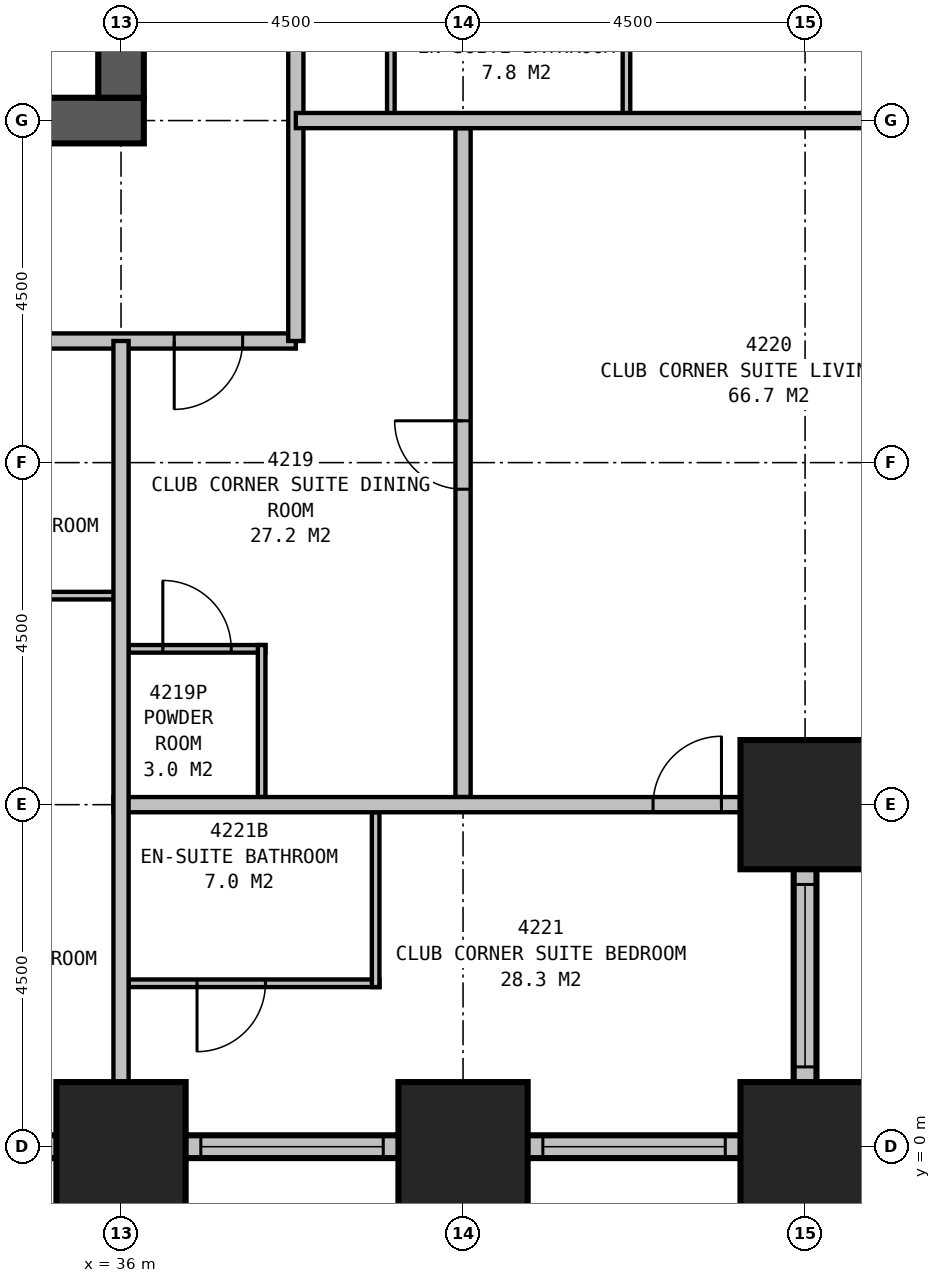
"""IFC4 building model, lengths in metres.
Left out: names, types, materials, properties, quantities, classifications, styles, units other than length and angle.
Written with IfcOpenShell. Run it as: python <this file> out.ifc"""

import sys

from ifc_helpers import new_model, si_unit, direction, frame, frame_2d, origin, origin_2d, place, context, subcontext, project, spatial, rectangle, extrude, element, fill, save


model = new_model("IFC4")
c1 = context("Model", 3, precision=1e-05, world=origin(), true_north=direction((0.0, 1.0)))
c2 = subcontext(c1, "Body", "Model", "MODEL_VIEW")
j1 = project(units=[si_unit("LENGTHUNIT", "METRE"), si_unit("PLANEANGLEUNIT", "RADIAN")], contexts=[c1])
p1 = place(None, origin())
s1 = spatial("IfcSite", under=j1, at=p1, CompositionType="ELEMENT")
p2 = place(p1, origin())
s2 = spatial("IfcBuilding", under=s1, at=p2, CompositionType="ELEMENT")
p3 = place(p2, frame((0.0, 0.0, 165.9)))
s3 = spatial("IfcBuildingStorey", under=s2, at=p3, CompositionType="ELEMENT", Elevation=165.9)
for number, where, z_axis, x_axis in (
    (1, (36.0, 0.0, 0.0), (0.0, 0.0, 1.0), (1.0, 0.0, 0.0)),
    (2, (40.5, 0.0, 0.0), (0.0, 0.0, 1.0), (1.0, 0.0, 0.0)),
    (3, (45.0, 0.0, 0.0), (0.0, 0.0, 1.0), (1.0, 0.0, 0.0)),
    (4, (45.0, 4.5, 0.0), (0.0, 0.0, 1.0), (1.0, 0.0, 0.0)),
):
    element("IfcColumn", number, at=place(p3, frame(where, z_axis=z_axis, x_axis=x_axis)), inside=s3, PredefinedType="COLUMN", context=c2, shape_type="SweptSolid", body=[
        extrude(rectangle(XDim=1.7, YDim=1.7, at=origin_2d()), origin(), (0.0, 0.0, 1.0), 3.5),
    ])
p4 = place(p3, frame((13.2, 13.5, 0.0), z_axis=(0.0, 0.0, 1.0), x_axis=(1.0, 0.0, 0.0)))
e5 = element("IfcWall", 5, at=p4, inside=s3, PredefinedType="SHEAR", context=c2, shape_type="SweptSolid", body=[
    extrude(rectangle(XDim=23.1, YDim=0.6, at=frame_2d((11.55, 0.0))), origin(), (0.0, 0.0, 1.0), 3.5),
])
p5 = place(p3, frame((36.0, 13.8, 0.0), z_axis=(0.0, 0.0, 1.0), x_axis=(0.0, 1.0, 0.0)))
e6 = element("IfcWall", 6, at=p5, inside=s3, PredefinedType="SHEAR", context=c2, shape_type="SweptSolid", body=[
    extrude(rectangle(XDim=2.7, YDim=0.6, at=frame_2d((1.35, 0.0))), origin(), (0.0, 0.0, 1.0), 3.5),
])
p6 = place(p3, frame((8.85, 0.0, 0.0), z_axis=(0.0, 0.0, 1.0), x_axis=(1.0, 0.0, 0.0)))
e7 = element("IfcWall", 7, at=p6, inside=s3, PredefinedType="STANDARD", context=c2, shape_type="SweptSolid", body=[
    extrude(rectangle(XDim=36.3, YDim=0.3, at=frame_2d((18.15, 0.0))), origin(), (0.0, 0.0, 1.0), 2.25),
])
p7 = place(p6, frame((1.65, 0.0, 0.5)))
e8 = element("IfcOpeningElement", 8, at=p7, cuts=e7, PredefinedType="OPENING", context=c2, shape_type="SweptSolid", body=[
    extrude(rectangle(XDim=1.5, YDim=1.6, at=frame_2d((0.75, 0.8))), frame((0.0, 0.16, 0.0), z_axis=(0.0, -1.0, 0.0), x_axis=(1.0, 0.0, 0.0)), (0.0, 0.0, 1.0), 0.32),
])
p8 = place(p6, frame((5.7, 0.0, 0.5)))
e9 = element("IfcOpeningElement", 9, at=p8, cuts=e7, PredefinedType="OPENING", context=c2, shape_type="SweptSolid", body=[
    extrude(rectangle(XDim=2.4, YDim=1.6, at=frame_2d((1.2, 0.8))), frame((0.0, 0.16, 0.0), z_axis=(0.0, -1.0, 0.0), x_axis=(1.0, 0.0, 0.0)), (0.0, 0.0, 1.0), 0.32),
])
p9 = place(p6, frame((10.2, 0.0, 0.5)))
e10 = element("IfcOpeningElement", 10, at=p9, cuts=e7, PredefinedType="OPENING", context=c2, shape_type="SweptSolid", body=[
    extrude(rectangle(XDim=2.4, YDim=1.6, at=frame_2d((1.2, 0.8))), frame((0.0, 0.16, 0.0), z_axis=(0.0, -1.0, 0.0), x_axis=(1.0, 0.0, 0.0)), (0.0, 0.0, 1.0), 0.32),
])
p10 = place(p6, frame((14.7, 0.0, 0.5)))
e11 = element("IfcOpeningElement", 11, at=p10, cuts=e7, PredefinedType="OPENING", context=c2, shape_type="SweptSolid", body=[
    extrude(rectangle(XDim=2.4, YDim=1.6, at=frame_2d((1.2, 0.8))), frame((0.0, 0.16, 0.0), z_axis=(0.0, -1.0, 0.0), x_axis=(1.0, 0.0, 0.0)), (0.0, 0.0, 1.0), 0.32),
])
p11 = place(p6, frame((19.2, 0.0, 0.5)))
e12 = element("IfcOpeningElement", 12, at=p11, cuts=e7, PredefinedType="OPENING", context=c2, shape_type="SweptSolid", body=[
    extrude(rectangle(XDim=2.4, YDim=1.6, at=frame_2d((1.2, 0.8))), frame((0.0, 0.16, 0.0), z_axis=(0.0, -1.0, 0.0), x_axis=(1.0, 0.0, 0.0)), (0.0, 0.0, 1.0), 0.32),
])
p12 = place(p6, frame((23.7, 0.0, 0.5)))
e13 = element("IfcOpeningElement", 13, at=p12, cuts=e7, PredefinedType="OPENING", context=c2, shape_type="SweptSolid", body=[
    extrude(rectangle(XDim=2.4, YDim=1.6, at=frame_2d((1.2, 0.8))), frame((0.0, 0.16, 0.0), z_axis=(0.0, -1.0, 0.0), x_axis=(1.0, 0.0, 0.0)), (0.0, 0.0, 1.0), 0.32),
])
p13 = place(p6, frame((28.2, 0.0, 0.5)))
e14 = element("IfcOpeningElement", 14, at=p13, cuts=e7, PredefinedType="OPENING", context=c2, shape_type="SweptSolid", body=[
    extrude(rectangle(XDim=2.4, YDim=1.6, at=frame_2d((1.2, 0.8))), frame((0.0, 0.16, 0.0), z_axis=(0.0, -1.0, 0.0), x_axis=(1.0, 0.0, 0.0)), (0.0, 0.0, 1.0), 0.32),
])
p14 = place(p6, frame((32.7, 0.0, 0.5)))
e15 = element("IfcOpeningElement", 15, at=p14, cuts=e7, PredefinedType="OPENING", context=c2, shape_type="SweptSolid", body=[
    extrude(rectangle(XDim=2.4, YDim=1.6, at=frame_2d((1.2, 0.8))), frame((0.0, 0.16, 0.0), z_axis=(0.0, -1.0, 0.0), x_axis=(1.0, 0.0, 0.0)), (0.0, 0.0, 1.0), 0.32),
])
p15 = place(p3, frame((45.0, -0.15, 0.0), z_axis=(0.0, 0.0, 1.0), x_axis=(0.0, 1.0, 0.0)))
e16 = element("IfcWall", 16, at=p15, inside=s3, PredefinedType="STANDARD", context=c2, shape_type="SweptSolid", body=[
    extrude(rectangle(XDim=4.8, YDim=0.3, at=frame_2d((2.4, 0.0))), origin(), (0.0, 0.0, 1.0), 2.25),
])
p16 = place(p15, frame((1.2, 0.0, 0.5)))
e17 = element("IfcOpeningElement", 17, at=p16, cuts=e16, PredefinedType="OPENING", context=c2, shape_type="SweptSolid", body=[
    extrude(rectangle(XDim=2.4, YDim=1.6, at=frame_2d((1.2, 0.8))), frame((0.0, 0.16, 0.0), z_axis=(0.0, -1.0, 0.0), x_axis=(1.0, 0.0, 0.0)), (0.0, 0.0, 1.0), 0.32),
])
p17 = place(p3, frame((44.85, 4.5, 0.0), z_axis=(0.0, 0.0, 1.0), x_axis=(1.0, 0.0, 0.0)))
e18 = element("IfcWall", 18, at=p17, inside=s3, PredefinedType="STANDARD", context=c2, shape_type="SweptSolid", body=[
    extrude(rectangle(XDim=4.3, YDim=0.3, at=frame_2d((2.15, 0.0))), origin(), (0.0, 0.0, 1.0), 2.25),
])
p18 = place(p17, frame((1.4, 0.0, 0.5)))
e19 = element("IfcOpeningElement", 19, at=p18, cuts=e18, PredefinedType="OPENING", context=c2, shape_type="SweptSolid", body=[
    extrude(rectangle(XDim=1.5, YDim=1.6, at=frame_2d((0.75, 0.8))), frame((0.0, 0.16, 0.0), z_axis=(0.0, -1.0, 0.0), x_axis=(1.0, 0.0, 0.0)), (0.0, 0.0, 1.0), 0.32),
])
p19 = place(p3, frame((49.017, 4.351, 0.0), z_axis=(0.0, 0.0, 1.0), x_axis=(-0.110433201132, 0.993883548555, 0.0)))
e20 = element("IfcWall", 20, at=p19, inside=s3, PredefinedType="STANDARD", context=c2, shape_type="SweptSolid", body=[
    extrude(rectangle(XDim=31.994, YDim=0.3, at=frame_2d((15.997, 0.0))), origin(), (0.0, 0.0, 1.0), 2.25),
])
p20 = place(p19, frame((1.664, 0.0, 0.5)))
e21 = element("IfcOpeningElement", 21, at=p20, cuts=e20, PredefinedType="OPENING", context=c2, shape_type="SweptSolid", body=[
    extrude(rectangle(XDim=1.5, YDim=1.6, at=frame_2d((0.75, 0.8))), frame((0.0, 0.16, 0.0), z_axis=(0.0, -1.0, 0.0), x_axis=(1.0, 0.0, 0.0)), (0.0, 0.0, 1.0), 0.32),
])
p21 = place(p19, frame((6.192, 0.0, 0.5)))
e22 = element("IfcOpeningElement", 22, at=p21, cuts=e20, PredefinedType="OPENING", context=c2, shape_type="SweptSolid", body=[
    extrude(rectangle(XDim=1.5, YDim=1.6, at=frame_2d((0.75, 0.8))), frame((0.0, 0.16, 0.0), z_axis=(0.0, -1.0, 0.0), x_axis=(1.0, 0.0, 0.0)), (0.0, 0.0, 1.0), 0.32),
])
p22 = place(p19, frame((10.719, 0.0, 0.5)))
e23 = element("IfcOpeningElement", 23, at=p22, cuts=e20, PredefinedType="OPENING", context=c2, shape_type="SweptSolid", body=[
    extrude(rectangle(XDim=1.5, YDim=1.6, at=frame_2d((0.75, 0.8))), frame((0.0, 0.16, 0.0), z_axis=(0.0, -1.0, 0.0), x_axis=(1.0, 0.0, 0.0)), (0.0, 0.0, 1.0), 0.32),
])
p23 = place(p19, frame((15.247, 0.0, 0.5)))
e24 = element("IfcOpeningElement", 24, at=p23, cuts=e20, PredefinedType="OPENING", context=c2, shape_type="SweptSolid", body=[
    extrude(rectangle(XDim=1.5, YDim=1.6, at=frame_2d((0.75, 0.8))), frame((0.0, 0.16, 0.0), z_axis=(0.0, -1.0, 0.0), x_axis=(1.0, 0.0, 0.0)), (0.0, 0.0, 1.0), 0.32),
])
p24 = place(p19, frame((19.775, 0.0, 0.5)))
e25 = element("IfcOpeningElement", 25, at=p24, cuts=e20, PredefinedType="OPENING", context=c2, shape_type="SweptSolid", body=[
    extrude(rectangle(XDim=1.5, YDim=1.6, at=frame_2d((0.75, 0.8))), frame((0.0, 0.16, 0.0), z_axis=(0.0, -1.0, 0.0), x_axis=(1.0, 0.0, 0.0)), (0.0, 0.0, 1.0), 0.32),
])
p25 = place(p19, frame((24.302, 0.0, 0.5)))
e26 = element("IfcOpeningElement", 26, at=p25, cuts=e20, PredefinedType="OPENING", context=c2, shape_type="SweptSolid", body=[
    extrude(rectangle(XDim=1.5, YDim=1.6, at=frame_2d((0.75, 0.8))), frame((0.0, 0.16, 0.0), z_axis=(0.0, -1.0, 0.0), x_axis=(1.0, 0.0, 0.0)), (0.0, 0.0, 1.0), 0.32),
])
p26 = place(p19, frame((28.83, 0.0, 0.5)))
e27 = element("IfcOpeningElement", 27, at=p26, cuts=e20, PredefinedType="OPENING", context=c2, shape_type="SweptSolid", body=[
    extrude(rectangle(XDim=1.5, YDim=1.6, at=frame_2d((0.75, 0.8))), frame((0.0, 0.16, 0.0), z_axis=(0.0, -1.0, 0.0), x_axis=(1.0, 0.0, 0.0)), (0.0, 0.0, 1.0), 0.32),
])
p27 = place(p3, frame((11.2, 10.6, 0.0), z_axis=(0.0, 0.0, 1.0), x_axis=(1.0, 0.0, 0.0)))
e28 = element("IfcWall", 28, at=p27, inside=s3, PredefinedType="PARTITIONING", context=c2, shape_type="SweptSolid", body=[
    extrude(rectangle(XDim=27.1, YDim=0.2, at=frame_2d((13.55, 0.0))), origin(), (0.0, 0.0, 1.0), 3.25),
])
p28 = place(p27, frame((4.05, 0.0, 0.0), z_axis=(0.0, 0.0, 1.0), x_axis=(-1.0, 0.0, 0.0)))
e29 = element("IfcOpeningElement", 29, at=p28, cuts=e28, PredefinedType="OPENING", context=c2, shape_type="SweptSolid", body=[
    extrude(rectangle(XDim=0.9, YDim=2.1, at=frame_2d((0.45, 1.05))), frame((0.0, 0.11, 0.0), z_axis=(0.0, -1.0, 0.0), x_axis=(1.0, 0.0, 0.0)), (0.0, 0.0, 1.0), 0.22),
])
p29 = place(p27, frame((12.65, 0.0, 0.0), z_axis=(0.0, 0.0, 1.0), x_axis=(-1.0, 0.0, 0.0)))
e30 = element("IfcOpeningElement", 30, at=p29, cuts=e28, PredefinedType="OPENING", context=c2, shape_type="SweptSolid", body=[
    extrude(rectangle(XDim=1.0, YDim=2.1, at=frame_2d((0.5, 1.05))), frame((0.0, 0.11, 0.0), z_axis=(0.0, -1.0, 0.0), x_axis=(1.0, 0.0, 0.0)), (0.0, 0.0, 1.0), 0.22),
])
p30 = place(p27, frame((17.55, 0.0, 0.0), z_axis=(0.0, 0.0, 1.0), x_axis=(-1.0, 0.0, 0.0)))
e31 = element("IfcOpeningElement", 31, at=p30, cuts=e28, PredefinedType="OPENING", context=c2, shape_type="SweptSolid", body=[
    extrude(rectangle(XDim=0.9, YDim=2.1, at=frame_2d((0.45, 1.05))), frame((0.0, 0.11, 0.0), z_axis=(0.0, -1.0, 0.0), x_axis=(1.0, 0.0, 0.0)), (0.0, 0.0, 1.0), 0.22),
])
p31 = place(p27, frame((1.6, 0.0, 0.0), z_axis=(0.0, 0.0, 1.0), x_axis=(-1.0, 0.0, 0.0)))
e32 = element("IfcOpeningElement", 32, at=p31, cuts=e28, PredefinedType="OPENING", context=c2, shape_type="SweptSolid", body=[
    extrude(rectangle(XDim=0.9, YDim=2.1, at=frame_2d((0.45, 1.05))), frame((0.0, 0.11, 0.0), z_axis=(0.0, -1.0, 0.0), x_axis=(1.0, 0.0, 0.0)), (0.0, 0.0, 1.0), 0.22),
])
p32 = place(p27, frame((26.4, 0.0, 0.0), z_axis=(0.0, 0.0, 1.0), x_axis=(-1.0, 0.0, 0.0)))
e33 = element("IfcOpeningElement", 33, at=p32, cuts=e28, PredefinedType="OPENING", context=c2, shape_type="SweptSolid", body=[
    extrude(rectangle(XDim=0.9, YDim=2.1, at=frame_2d((0.45, 1.05))), frame((0.0, 0.11, 0.0), z_axis=(0.0, -1.0, 0.0), x_axis=(1.0, 0.0, 0.0)), (0.0, 0.0, 1.0), 0.22),
])
p33 = place(p3, frame((38.3, 10.6, 0.0), z_axis=(0.0, 0.0, 1.0), x_axis=(0.0, 1.0, 0.0)))
e34 = element("IfcWall", 34, at=p33, inside=s3, PredefinedType="PARTITIONING", context=c2, shape_type="SweptSolid", body=[
    extrude(rectangle(XDim=18.7, YDim=0.2, at=frame_2d((9.35, 0.0))), origin(), (0.0, 0.0, 1.0), 3.25),
])
p34 = place(p33, frame((6.95, 0.0, 0.0), z_axis=(0.0, 0.0, 1.0), x_axis=(-1.0, 0.0, 0.0)))
e35 = element("IfcOpeningElement", 35, at=p34, cuts=e34, PredefinedType="OPENING", context=c2, shape_type="SweptSolid", body=[
    extrude(rectangle(XDim=0.9, YDim=2.1, at=frame_2d((0.45, 1.05))), frame((0.0, 0.11, 0.0), z_axis=(0.0, -1.0, 0.0), x_axis=(1.0, 0.0, 0.0)), (0.0, 0.0, 1.0), 0.22),
])
p35 = place(p33, frame((11.05, 0.0, 0.0), z_axis=(0.0, 0.0, 1.0), x_axis=(-1.0, 0.0, 0.0)))
e36 = element("IfcOpeningElement", 36, at=p35, cuts=e34, PredefinedType="OPENING", context=c2, shape_type="SweptSolid", body=[
    extrude(rectangle(XDim=0.9, YDim=2.1, at=frame_2d((0.45, 1.05))), frame((0.0, 0.11, 0.0), z_axis=(0.0, -1.0, 0.0), x_axis=(1.0, 0.0, 0.0)), (0.0, 0.0, 1.0), 0.22),
])
p36 = place(p3, frame((32.85, 7.25, 0.0), z_axis=(0.0, 0.0, 1.0), x_axis=(1.0, 0.0, 0.0)))
e37 = element("IfcWall", 37, at=p36, inside=s3, PredefinedType="PLUMBINGWALL", context=c2, shape_type="SweptSolid", body=[
    extrude(rectangle(XDim=3.15, YDim=0.1, at=frame_2d((1.575, 0.0))), origin(), (0.0, 0.0, 1.0), 3.25),
])
for number, where, z_axis, x_axis in (
    (38, (39.55, 13.5, 0.0), (0.0, 0.0, 1.0), (0.0, 1.0, 0.0)),
    (39, (42.65, 13.5, 0.0), (0.0, 0.0, 1.0), (0.0, 1.0, 0.0)),
):
    element("IfcWall", number, at=place(p3, frame(where, z_axis=z_axis, x_axis=x_axis)), inside=s3, PredefinedType="PLUMBINGWALL", context=c2, shape_type="SweptSolid", body=[
        extrude(rectangle(XDim=2.8, YDim=0.1, at=frame_2d((1.4, 0.0))), origin(), (0.0, 0.0, 1.0), 3.25),
    ])
p37 = place(p3, frame((38.3, 13.5, 0.0), z_axis=(0.0, 0.0, 1.0), x_axis=(1.0, 0.0, 0.0)))
e40 = element("IfcWall", 40, at=p37, inside=s3, PredefinedType="PARTITIONING", context=c2, shape_type="SweptSolid", body=[
    extrude(rectangle(XDim=9.921, YDim=0.2, at=frame_2d((4.96, 0.0))), origin(), (0.0, 0.0, 1.0), 1.95),
])
p38 = place(p3, frame((36.0, 10.6, 0.0), z_axis=(0.0, 0.0, 1.0), x_axis=(0.0, -1.0, 0.0)))
e41 = element("IfcWall", 41, at=p38, inside=s3, PredefinedType="PARTITIONING", context=c2, shape_type="SweptSolid", body=[
    extrude(rectangle(XDim=10.6, YDim=0.2, at=frame_2d((5.3, 0.0))), origin(), (0.0, 0.0, 1.0), 2.25),
])
p39 = place(p3, frame((35.9, 4.5, 0.0), z_axis=(0.0, 0.0, 1.0), x_axis=(1.0, 0.0, 0.0)))
e42 = element("IfcWall", 42, at=p39, inside=s3, PredefinedType="PARTITIONING", context=c2, shape_type="SweptSolid", body=[
    extrude(rectangle(XDim=9.1, YDim=0.2, at=frame_2d((4.55, 0.0))), origin(), (0.0, 0.0, 1.0), 3.25),
])
p40 = place(p39, frame((7.1, 0.0, 0.0)))
e43 = element("IfcOpeningElement", 43, at=p40, cuts=e42, PredefinedType="OPENING", context=c2, shape_type="SweptSolid", body=[
    extrude(rectangle(XDim=0.9, YDim=2.1, at=frame_2d((0.45, 1.05))), frame((0.0, 0.11, 0.0), z_axis=(0.0, -1.0, 0.0), x_axis=(1.0, 0.0, 0.0)), (0.0, 0.0, 1.0), 0.22),
])
p41 = place(p3, frame((40.5, 4.6, 0.0), z_axis=(0.0, 0.0, 1.0), x_axis=(0.0, 1.0, 0.0)))
e44 = element("IfcWall", 44, at=p41, inside=s3, PredefinedType="PARTITIONING", context=c2, shape_type="SweptSolid", body=[
    extrude(rectangle(XDim=8.8, YDim=0.2, at=frame_2d((4.4, 0.0))), origin(), (0.0, 0.0, 1.0), 2.25),
])
p42 = place(p41, frame((4.05, 0.0, 0.0)))
e45 = element("IfcOpeningElement", 45, at=p42, cuts=e44, PredefinedType="OPENING", context=c2, shape_type="SweptSolid", body=[
    extrude(rectangle(XDim=0.9, YDim=2.1, at=frame_2d((0.45, 1.05))), frame((0.0, 0.11, 0.0), z_axis=(0.0, -1.0, 0.0), x_axis=(1.0, 0.0, 0.0)), (0.0, 0.0, 1.0), 0.22),
])
p43 = place(p3, frame((37.85, 4.6, 0.0), z_axis=(0.0, 0.0, 1.0), x_axis=(0.0, 1.0, 0.0)))
e46 = element("IfcWall", 46, at=p43, inside=s3, PredefinedType="PLUMBINGWALL", context=c2, shape_type="SweptSolid", body=[
    extrude(rectangle(XDim=2.0, YDim=0.1, at=frame_2d((1.0, 0.0))), origin(), (0.0, 0.0, 1.0), 3.25),
])
p44 = place(p3, frame((36.1, 6.55, 0.0), z_axis=(0.0, 0.0, 1.0), x_axis=(1.0, 0.0, 0.0)))
e47 = element("IfcWall", 47, at=p44, inside=s3, PredefinedType="PLUMBINGWALL", context=c2, shape_type="SweptSolid", body=[
    extrude(rectangle(XDim=1.8, YDim=0.1, at=frame_2d((0.9, 0.0))), origin(), (0.0, 0.0, 1.0), 3.25),
])
p45 = place(p44, frame((0.45, 0.0, 0.0)))
e48 = element("IfcOpeningElement", 48, at=p45, cuts=e47, PredefinedType="OPENING", context=c2, shape_type="SweptSolid", body=[
    extrude(rectangle(XDim=0.9, YDim=2.1, at=frame_2d((0.45, 1.05))), frame((0.0, 0.06, 0.0), z_axis=(0.0, -1.0, 0.0), x_axis=(1.0, 0.0, 0.0)), (0.0, 0.0, 1.0), 0.12),
])
p46 = place(p3, frame((39.35, 4.4, 0.0), z_axis=(0.0, 0.0, 1.0), x_axis=(0.0, -1.0, 0.0)))
e49 = element("IfcWall", 49, at=p46, inside=s3, PredefinedType="PLUMBINGWALL", context=c2, shape_type="SweptSolid", body=[
    extrude(rectangle(XDim=2.3, YDim=0.1, at=frame_2d((1.15, 0.0))), origin(), (0.0, 0.0, 1.0), 3.25),
])
p47 = place(p3, frame((36.1, 2.15, 0.0), z_axis=(0.0, 0.0, 1.0), x_axis=(1.0, 0.0, 0.0)))
e50 = element("IfcWall", 50, at=p47, inside=s3, PredefinedType="PLUMBINGWALL", context=c2, shape_type="SweptSolid", body=[
    extrude(rectangle(XDim=3.3, YDim=0.1, at=frame_2d((1.65, 0.0))), origin(), (0.0, 0.0, 1.0), 3.25),
])
p48 = place(p47, frame((1.8, 0.0, 0.0), z_axis=(0.0, 0.0, 1.0), x_axis=(-1.0, 0.0, 0.0)))
e51 = element("IfcOpeningElement", 51, at=p48, cuts=e50, PredefinedType="OPENING", context=c2, shape_type="SweptSolid", body=[
    extrude(rectangle(XDim=0.9, YDim=2.1, at=frame_2d((0.45, 1.05))), frame((0.0, 0.06, 0.0), z_axis=(0.0, -1.0, 0.0), x_axis=(1.0, 0.0, 0.0)), (0.0, 0.0, 1.0), 0.12),
])
p49 = place(p13, origin())
e52 = element("IfcWindow", 52, at=p49, inside=s3, PartitioningType="SINGLE_PANEL", PredefinedType="WINDOW", context=c2, shape_type="SweptSolid", body=[
    extrude(rectangle(XDim=2.4, YDim=1.6, at=frame_2d((1.2, 0.8))), frame((0.0, 0.03, 0.0), z_axis=(0.0, -1.0, 0.0), x_axis=(1.0, 0.0, 0.0)), (0.0, 0.0, 1.0), 0.06),
])
fill(e14, e52)
p50 = place(p14, origin())
e53 = element("IfcWindow", 53, at=p50, inside=s3, PartitioningType="SINGLE_PANEL", PredefinedType="WINDOW", context=c2, shape_type="SweptSolid", body=[
    extrude(rectangle(XDim=2.4, YDim=1.6, at=frame_2d((1.2, 0.8))), frame((0.0, 0.03, 0.0), z_axis=(0.0, -1.0, 0.0), x_axis=(1.0, 0.0, 0.0)), (0.0, 0.0, 1.0), 0.06),
])
fill(e15, e53)
p51 = place(p16, origin())
e54 = element("IfcWindow", 54, at=p51, inside=s3, PartitioningType="SINGLE_PANEL", PredefinedType="WINDOW", context=c2, shape_type="SweptSolid", body=[
    extrude(rectangle(XDim=2.4, YDim=1.6, at=frame_2d((1.2, 0.8))), frame((0.0, 0.03, 0.0), z_axis=(0.0, -1.0, 0.0), x_axis=(1.0, 0.0, 0.0)), (0.0, 0.0, 1.0), 0.06),
])
fill(e17, e54)
p52 = place(p32, origin())
e55 = element("IfcDoor", 55, at=p52, inside=s3, OperationType="SINGLE_SWING_RIGHT", PredefinedType="DOOR", context=c2, shape_type="SweptSolid", body=[
    extrude(rectangle(XDim=0.9, YDim=2.1, at=frame_2d((0.45, 1.05))), frame((0.0, 0.025, 0.0), z_axis=(0.0, -1.0, 0.0), x_axis=(1.0, 0.0, 0.0)), (0.0, 0.0, 1.0), 0.05),
])
fill(e33, e55)
p53 = place(p40, origin())
e56 = element("IfcDoor", 56, at=p53, inside=s3, OperationType="SINGLE_SWING_RIGHT", PredefinedType="DOOR", context=c2, shape_type="SweptSolid", body=[
    extrude(rectangle(XDim=0.9, YDim=2.1, at=frame_2d((0.45, 1.05))), frame((0.0, 0.025, 0.0), z_axis=(0.0, -1.0, 0.0), x_axis=(1.0, 0.0, 0.0)), (0.0, 0.0, 1.0), 0.05),
])
fill(e43, e56)
p54 = place(p42, origin())
e57 = element("IfcDoor", 57, at=p54, inside=s3, OperationType="SINGLE_SWING_RIGHT", PredefinedType="DOOR", context=c2, shape_type="SweptSolid", body=[
    extrude(rectangle(XDim=0.9, YDim=2.1, at=frame_2d((0.45, 1.05))), frame((0.0, 0.025, 0.0), z_axis=(0.0, -1.0, 0.0), x_axis=(1.0, 0.0, 0.0)), (0.0, 0.0, 1.0), 0.05),
])
fill(e45, e57)
p55 = place(p45, origin())
e58 = element("IfcDoor", 58, at=p55, inside=s3, OperationType="SINGLE_SWING_LEFT", PredefinedType="DOOR", context=c2, shape_type="SweptSolid", body=[
    extrude(rectangle(XDim=0.9, YDim=2.1, at=frame_2d((0.45, 1.05))), frame((0.0, 0.025, 0.0), z_axis=(0.0, -1.0, 0.0), x_axis=(1.0, 0.0, 0.0)), (0.0, 0.0, 1.0), 0.05),
])
fill(e48, e58)
p56 = place(p48, origin())
e59 = element("IfcDoor", 59, at=p56, inside=s3, OperationType="SINGLE_SWING_RIGHT", PredefinedType="DOOR", context=c2, shape_type="SweptSolid", body=[
    extrude(rectangle(XDim=0.9, YDim=2.1, at=frame_2d((0.45, 1.05))), frame((0.0, 0.025, 0.0), z_axis=(0.0, -1.0, 0.0), x_axis=(1.0, 0.0, 0.0)), (0.0, 0.0, 1.0), 0.05),
])
fill(e51, e59)
save(model, sys.argv[1])
